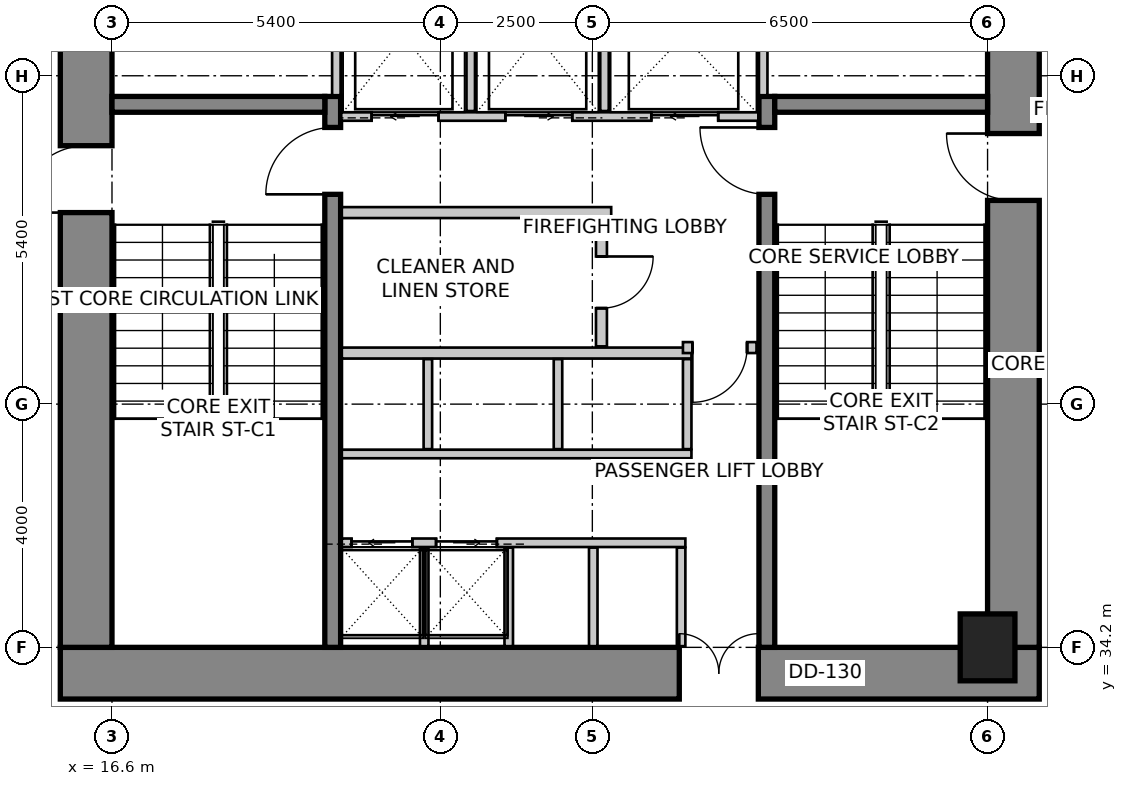
"""IFC4 building model, lengths in metres.
Left out: names, types, materials, properties, quantities, classifications, styles, units other than length and angle.
Written with IfcOpenShell. Run it as: python <this file> out.ifc"""

import sys

from ifc_helpers import new_model, si_unit, direction, frame, frame_2d, origin, origin_2d, place, context, subcontext, project, spatial, rectangle, extrude, source, transform, mapped, element, fill, save


model = new_model("IFC4")
c1 = context("Model", 3, precision=1e-05, world=origin(), true_north=direction((0.0, 1.0)))
c2 = subcontext(c1, "Body", "Model", "MODEL_VIEW")
j1 = project(units=[si_unit("LENGTHUNIT", "METRE"), si_unit("PLANEANGLEUNIT", "RADIAN")], contexts=[c1])
p1 = place(None, origin())
s1 = spatial("IfcSite", under=j1, at=p1, CompositionType="ELEMENT")
p2 = place(p1, origin())
s2 = spatial("IfcBuilding", under=s1, at=p2, CompositionType="ELEMENT")
p3 = place(p2, frame((0.0, 0.0, 55.0)))
s3 = spatial("IfcBuildingStorey", under=s2, at=p3, CompositionType="ELEMENT", Elevation=55.0)
p4 = place(p3, frame((15.75, 33.775, 0.0), z_axis=(0.0, 0.0, 1.0), x_axis=(1.0, 0.0, 0.0)))
e1 = element("IfcWall", 1, at=p4, inside=s3, PredefinedType="SHEAR", context=c2, shape_type="SweptSolid", body=[
    extrude(rectangle(XDim=16.1, YDim=0.85, at=frame_2d((8.05, 0.0))), origin(), (0.0, 0.0, 1.0), 4.0),
])
m1 = source(origin(), c2, "Body", "SweptSolid", [
    extrude(rectangle(XDim=1.3, YDim=2.15, at=frame_2d((0.65, 1.075))), frame((0.0, 0.435, 0.0), z_axis=(0.0, -1.0, 0.0), x_axis=(1.0, 0.0, 0.0)), (0.0, 0.0, 1.0), 0.87),
])
p5 = place(p4, frame((10.18, 0.0, 0.0)))
e2 = element("IfcOpeningElement", 2, at=p5, cuts=e1, PredefinedType="OPENING", context=c2, shape_type="MappedRepresentation", body=[
    mapped(m1, transform((0.0, 0.0, 0.0), scale=1.0)),
])
p6 = place(p3, frame((16.175, 34.2, 0.0), z_axis=(0.0, 0.0, 1.0), x_axis=(0.0, 1.0, 0.0)))
e3 = element("IfcWall", 3, at=p6, inside=s3, PredefinedType="SHEAR", context=c2, shape_type="SweptSolid", body=[
    extrude(rectangle(XDim=11.4, YDim=0.85, at=frame_2d((5.7, 0.0))), origin(), (0.0, 0.0, 1.0), 4.0),
])
m2 = source(origin(), c2, "Body", "SweptSolid", [
    extrude(rectangle(XDim=1.1, YDim=2.15, at=frame_2d((0.55, 1.075))), frame((0.0, 0.435, 0.0), z_axis=(0.0, -1.0, 0.0), x_axis=(1.0, 0.0, 0.0)), (0.0, 0.0, 1.0), 0.87),
])
p7 = place(p6, frame((7.15, 0.0, 0.0)))
e4 = element("IfcOpeningElement", 4, at=p7, cuts=e3, PredefinedType="OPENING", context=c2, shape_type="MappedRepresentation", body=[
    mapped(m2, transform((0.0, 0.0, 0.0), scale=1.0)),
])
p8 = place(p3, frame((31.425, 34.2, 0.0), z_axis=(0.0, 0.0, 1.0), x_axis=(0.0, 1.0, 0.0)))
e5 = element("IfcWall", 5, at=p8, inside=s3, PredefinedType="SHEAR", context=c2, shape_type="SweptSolid", body=[
    extrude(rectangle(XDim=11.4, YDim=0.85, at=frame_2d((5.7, 0.0))), origin(), (0.0, 0.0, 1.0), 4.0),
])
p9 = place(p8, frame((7.35, 0.0, 0.0)))
e6 = element("IfcOpeningElement", 6, at=p9, cuts=e5, PredefinedType="OPENING", context=c2, shape_type="MappedRepresentation", body=[
    mapped(m2, transform((0.0, 0.0, 0.0), scale=1.0)),
])
p10 = place(p3, frame((20.23, 34.2, 0.0), z_axis=(0.0, 0.0, 1.0), x_axis=(0.0, 1.0, 0.0)))
e7 = element("IfcWall", 7, at=p10, inside=s3, PredefinedType="SHEAR", context=c2, shape_type="SweptSolid", body=[
    extrude(rectangle(XDim=9.06, YDim=0.26, at=frame_2d((4.53, 0.0))), origin(), (0.0, 0.0, 1.0), 4.0),
])
m3 = source(origin(), c2, "Body", "SweptSolid", [
    extrude(rectangle(XDim=1.1, YDim=2.15, at=frame_2d((0.55, 1.075))), frame((0.0, 0.14, 0.0), z_axis=(0.0, -1.0, 0.0), x_axis=(1.0, 0.0, 0.0)), (0.0, 0.0, 1.0), 0.28),
])
p11 = place(p10, frame((7.45, 0.0, 0.0)))
e8 = element("IfcOpeningElement", 8, at=p11, cuts=e7, PredefinedType="OPENING", context=c2, shape_type="MappedRepresentation", body=[
    mapped(m3, transform((0.0, 0.0, 0.0), scale=1.0)),
])
p12 = place(p3, frame((27.37, 34.2, 0.0), z_axis=(0.0, 0.0, 1.0), x_axis=(0.0, 1.0, 0.0)))
e9 = element("IfcWall", 9, at=p12, inside=s3, PredefinedType="SHEAR", context=c2, shape_type="SweptSolid", body=[
    extrude(rectangle(XDim=9.06, YDim=0.26, at=frame_2d((4.53, 0.0))), origin(), (0.0, 0.0, 1.0), 4.0),
])
p13 = place(p12, frame((7.45, 0.0, 0.0)))
e10 = element("IfcOpeningElement", 10, at=p13, cuts=e9, PredefinedType="OPENING", context=c2, shape_type="MappedRepresentation", body=[
    mapped(m3, transform((0.0, 0.0, 0.0), scale=1.0)),
])
for number, where, z_axis, x_axis in (
    (11, (16.6, 43.13, 0.0), (0.0, 0.0, 1.0), (1.0, 0.0, 0.0)),
    (12, (27.5, 43.13, 0.0), (0.0, 0.0, 1.0), (1.0, 0.0, 0.0)),
):
    element("IfcWall", number, at=place(p3, frame(where, z_axis=z_axis, x_axis=x_axis)), inside=s3, PredefinedType="SHEAR", context=c2, shape_type="SweptSolid", body=[
        extrude(rectangle(XDim=3.5, YDim=0.26, at=frame_2d((1.75, 0.0))), origin(), (0.0, 0.0, 1.0), 4.0),
    ])
m4 = source(origin(), c2, "Body", "SweptSolid", [
    extrude(rectangle(XDim=0.9, YDim=1.1, at=origin_2d()), origin(), (0.0, 0.0, 1.0), 4.0),
])
p14 = place(p3, frame((31.0, 34.2, 0.0), z_axis=(0.0, 0.0, 1.0), x_axis=(1.0, 0.0, 0.0)))
e13 = element("IfcColumn", 13, at=p14, inside=s3, PredefinedType="COLUMN", context=c2, shape_type="MappedRepresentation", body=[
    mapped(m4, transform((0.0, 0.0, 0.0), scale=1.0)),
])
p15 = place(p3, frame((20.37, 42.93, 0.0), z_axis=(0.0, 0.0, 1.0), x_axis=(1.0, 0.0, 0.0)))
e14 = element("IfcWall", 14, at=p15, inside=s3, PredefinedType="SOLIDWALL", context=c2, shape_type="SweptSolid", body=[
    extrude(rectangle(XDim=6.86, YDim=0.14, at=frame_2d((3.43, 0.0))), origin(), (0.0, 0.0, 1.0), 3.75),
])
m5 = source(origin(), c2, "Body", "SweptSolid", [
    extrude(rectangle(XDim=1.1, YDim=2.15, at=frame_2d((0.55, 1.075))), frame((0.0, 0.08, 0.0), z_axis=(0.0, -1.0, 0.0), x_axis=(1.0, 0.0, 0.0)), (0.0, 0.0, 1.0), 0.16),
])
p16 = place(p15, frame((0.5, 0.0, 0.0)))
e15 = element("IfcOpeningElement", 15, at=p16, cuts=e14, PredefinedType="OPENING", context=c2, shape_type="MappedRepresentation", body=[
    mapped(m5, transform((0.0, 0.0, 0.0), scale=1.0)),
])
p17 = place(p15, frame((2.7, 0.0, 0.0)))
e16 = element("IfcOpeningElement", 16, at=p17, cuts=e14, PredefinedType="OPENING", context=c2, shape_type="MappedRepresentation", body=[
    mapped(m5, transform((0.0, 0.0, 0.0), scale=1.0)),
])
p18 = place(p15, frame((5.1, 0.0, 0.0)))
e17 = element("IfcOpeningElement", 17, at=p18, cuts=e14, PredefinedType="OPENING", context=c2, shape_type="MappedRepresentation", body=[
    mapped(m5, transform((0.0, 0.0, 0.0), scale=1.0)),
])
for number, where, z_axis, x_axis in (
    (18, (20.29, 43.28, 0.0), (0.0, 0.0, 1.0), (0.0, 1.0, 0.0)),
    (19, (27.31, 43.28, 0.0), (0.0, 0.0, 1.0), (0.0, 1.0, 0.0)),
):
    element("IfcWall", number, at=place(p3, frame(where, z_axis=z_axis, x_axis=x_axis)), inside=s3, PredefinedType="SOLIDWALL", context=c2, shape_type="SweptSolid", body=[
        extrude(rectangle(XDim=2.3, YDim=0.14, at=frame_2d((1.15, 0.0))), origin(), (0.0, 0.0, 1.0), 3.75),
    ])
for number, where, z_axis, x_axis in (
    (20, (22.5, 43.02, 0.0), (0.0, 0.0, 1.0), (0.0, 1.0, 0.0)),
    (21, (24.7, 43.02, 0.0), (0.0, 0.0, 1.0), (0.0, 1.0, 0.0)),
):
    element("IfcWall", number, at=place(p3, frame(where, z_axis=z_axis, x_axis=x_axis)), inside=s3, PredefinedType="SOLIDWALL", context=c2, shape_type="SweptSolid", body=[
        extrude(rectangle(XDim=2.56, YDim=0.14, at=frame_2d((1.28, 0.0))), origin(), (0.0, 0.0, 1.0), 3.75),
    ])
p19 = place(p3, frame((20.38, 35.92, 0.0), z_axis=(0.0, 0.0, 1.0), x_axis=(1.0, 0.0, 0.0)))
e22 = element("IfcWall", 22, at=p19, inside=s3, PredefinedType="SOLIDWALL", context=c2, shape_type="SweptSolid", body=[
    extrude(rectangle(XDim=5.65, YDim=0.14, at=frame_2d((2.825, 0.0))), origin(), (0.0, 0.0, 1.0), 3.75),
])
m6 = source(origin(), c2, "Body", "SweptSolid", [
    extrude(rectangle(XDim=1.0, YDim=2.15, at=frame_2d((0.5, 1.075))), frame((0.0, 0.08, 0.0), z_axis=(0.0, -1.0, 0.0), x_axis=(1.0, 0.0, 0.0)), (0.0, 0.0, 1.0), 0.16),
])
p20 = place(p19, frame((0.16, 0.0, 0.0)))
e23 = element("IfcOpeningElement", 23, at=p20, cuts=e22, PredefinedType="OPENING", context=c2, shape_type="MappedRepresentation", body=[
    mapped(m6, transform((0.0, 0.0, 0.0), scale=1.0)),
])
p21 = place(p19, frame((1.55, 0.0, 0.0)))
e24 = element("IfcOpeningElement", 24, at=p21, cuts=e22, PredefinedType="OPENING", context=c2, shape_type="MappedRepresentation", body=[
    mapped(m6, transform((0.0, 0.0, 0.0), scale=1.0)),
])
for number, where, z_axis, x_axis in (
    (25, (25.96, 34.22, 0.0), (0.0, 0.0, 1.0), (0.0, 1.0, 0.0)),
    (26, (21.735, 34.22, 0.0), (0.0, 0.0, 1.0), (0.0, 1.0, 0.0)),
    (27, (23.125, 34.22, 0.0), (0.0, 0.0, 1.0), (0.0, 1.0, 0.0)),
    (28, (24.515, 34.22, 0.0), (0.0, 0.0, 1.0), (0.0, 1.0, 0.0)),
):
    element("IfcWall", number, at=place(p3, frame(where, z_axis=z_axis, x_axis=x_axis)), inside=s3, PredefinedType="SOLIDWALL", context=c2, shape_type="SweptSolid", body=[
        extrude(rectangle(XDim=1.62, YDim=0.14, at=frame_2d((0.81, 0.0))), origin(), (0.0, 0.0, 1.0), 3.042),
    ])
p22 = place(p3, frame((20.38, 37.38, 0.0), z_axis=(0.0, 0.0, 1.0), x_axis=(1.0, 0.0, 0.0)))
e29 = element("IfcWall", 29, at=p22, inside=s3, PredefinedType="SOLIDWALL", context=c2, shape_type="SweptSolid", body=[
    extrude(rectangle(XDim=5.75, YDim=0.14, at=frame_2d((2.875, 0.0))), origin(), (0.0, 0.0, 1.0), 3.75),
])
p23 = place(p3, frame((20.38, 39.04, 0.0), z_axis=(0.0, 0.0, 1.0), x_axis=(1.0, 0.0, 0.0)))
e30 = element("IfcWall", 30, at=p23, inside=s3, PredefinedType="SOLIDWALL", context=c2, shape_type="SweptSolid", body=[
    extrude(rectangle(XDim=5.75, YDim=0.18, at=frame_2d((2.875, 0.0))), origin(), (0.0, 0.0, 1.0), 3.75),
])
for number, where, z_axis, x_axis in (
    (31, (26.06, 37.46, 0.0), (0.0, 0.0, 1.0), (0.0, 1.0, 0.0)),
    (32, (21.795, 37.46, 0.0), (0.0, 0.0, 1.0), (0.0, 1.0, 0.0)),
    (33, (23.935, 37.46, 0.0), (0.0, 0.0, 1.0), (0.0, 1.0, 0.0)),
):
    element("IfcWall", number, at=place(p3, frame(where, z_axis=z_axis, x_axis=x_axis)), inside=s3, PredefinedType="SOLIDWALL", context=c2, shape_type="SweptSolid", body=[
        extrude(rectangle(XDim=1.48, YDim=0.14, at=frame_2d((0.74, 0.0))), origin(), (0.0, 0.0, 1.0), 3.75),
    ])
p24 = place(p3, frame((24.81, 41.35, 0.0), z_axis=(0.0, 0.0, 1.0), x_axis=(-1.0, 0.0, 0.0)))
e34 = element("IfcWall", 34, at=p24, inside=s3, PredefinedType="PARTITIONING", context=c2, shape_type="SweptSolid", body=[
    extrude(rectangle(XDim=4.43, YDim=0.18, at=frame_2d((2.215, 0.0))), origin(), (0.0, 0.0, 1.0), 3.75),
])
p25 = place(p3, frame((24.65, 41.256, 0.0), z_axis=(0.0, 0.0, 1.0), x_axis=(0.0, -1.0, 0.0)))
e35 = element("IfcWall", 35, at=p25, inside=s3, PredefinedType="PARTITIONING", context=c2, shape_type="SweptSolid", body=[
    extrude(rectangle(XDim=2.106, YDim=0.18, at=frame_2d((1.053, 0.0))), origin(), (0.0, 0.0, 1.0), 3.75),
])
m7 = source(origin(), c2, "Body", "SweptSolid", [
    extrude(rectangle(XDim=0.85, YDim=2.15, at=frame_2d((0.425, 1.075))), frame((0.0, 0.1, 0.0), z_axis=(0.0, -1.0, 0.0), x_axis=(1.0, 0.0, 0.0)), (0.0, 0.0, 1.0), 0.2),
])
p26 = place(p25, frame((0.628, 0.0, 0.0)))
e36 = element("IfcOpeningElement", 36, at=p26, cuts=e35, PredefinedType="OPENING", context=c2, shape_type="MappedRepresentation", body=[
    mapped(m7, transform((0.0, 0.0, 0.0), scale=1.0)),
])
p27 = place(p3, frame((27.2, 39.13, 0.0), z_axis=(0.0, 0.0, 1.0), x_axis=(-1.0, 0.0, 0.0)))
e37 = element("IfcWall", 37, at=p27, inside=s3, PredefinedType="PARTITIONING", context=c2, shape_type="SweptSolid", body=[
    extrude(rectangle(XDim=1.21, YDim=0.18, at=frame_2d((0.605, 0.0))), origin(), (0.0, 0.0, 1.0), 3.75),
])
m8 = source(origin(), c2, "Body", "SweptSolid", [
    extrude(rectangle(XDim=0.9, YDim=2.15, at=frame_2d((0.45, 1.075))), frame((0.0, 0.1, 0.0), z_axis=(0.0, -1.0, 0.0), x_axis=(1.0, 0.0, 0.0)), (0.0, 0.0, 1.0), 0.2),
])
p28 = place(p27, frame((0.155, 0.0, 0.0)))
e38 = element("IfcOpeningElement", 38, at=p28, cuts=e37, PredefinedType="OPENING", context=c2, shape_type="MappedRepresentation", body=[
    mapped(m8, transform((0.0, 0.0, 0.0), scale=1.0)),
])
m9 = source(origin(), c2, "Body", "SweptSolid", [
    extrude(rectangle(XDim=1.1, YDim=2.15, at=frame_2d((0.55, 1.075))), frame((0.0, 0.025, 0.0), z_axis=(0.0, -1.0, 0.0), x_axis=(1.0, 0.0, 0.0)), (0.0, 0.0, 1.0), 0.05),
])
p29 = place(p16, origin())
e39 = element("IfcDoor", 39, at=p29, inside=s3, OperationType="SLIDING_TO_LEFT", PredefinedType="DOOR", context=c2, shape_type="MappedRepresentation", body=[
    mapped(m9, transform((0.0, 0.0, 0.0), scale=1.0)),
])
fill(e15, e39)
p30 = place(p17, origin())
e40 = element("IfcDoor", 40, at=p30, inside=s3, OperationType="SLIDING_TO_RIGHT", PredefinedType="DOOR", context=c2, shape_type="MappedRepresentation", body=[
    mapped(m9, transform((0.0, 0.0, 0.0), scale=1.0)),
])
fill(e16, e40)
m10 = source(origin(), c2, "Body", "SweptSolid", [
    extrude(rectangle(XDim=1.1, YDim=2.15, at=frame_2d((0.55, 1.075))), frame((0.0, 0.025, 0.0), z_axis=(0.0, -1.0, 0.0), x_axis=(1.0, 0.0, 0.0)), (0.0, 0.0, 1.0), 0.05),
])
p31 = place(p18, origin())
e41 = element("IfcDoor", 41, at=p31, inside=s3, OperationType="SLIDING_TO_LEFT", PredefinedType="DOOR", context=c2, shape_type="MappedRepresentation", body=[
    mapped(m10, transform((0.0, 0.0, 0.0), scale=1.0)),
])
fill(e17, e41)
m11 = source(origin(), c2, "Body", "SweptSolid", [
    extrude(rectangle(XDim=1.0, YDim=2.15, at=frame_2d((0.5, 1.075))), frame((0.0, 0.025, 0.0), z_axis=(0.0, -1.0, 0.0), x_axis=(1.0, 0.0, 0.0)), (0.0, 0.0, 1.0), 0.05),
])
p32 = place(p20, origin())
e42 = element("IfcDoor", 42, at=p32, inside=s3, OperationType="SLIDING_TO_LEFT", PredefinedType="DOOR", context=c2, shape_type="MappedRepresentation", body=[
    mapped(m11, transform((0.0, 0.0, 0.0), scale=1.0)),
])
fill(e23, e42)
p33 = place(p21, origin())
e43 = element("IfcDoor", 43, at=p33, inside=s3, OperationType="SLIDING_TO_RIGHT", PredefinedType="DOOR", context=c2, shape_type="MappedRepresentation", body=[
    mapped(m11, transform((0.0, 0.0, 0.0), scale=1.0)),
])
fill(e24, e43)
m12 = source(origin(), c2, "Body", "SweptSolid", [
    extrude(rectangle(XDim=1.1, YDim=2.15, at=frame_2d((0.55, 1.075))), frame((0.0, 0.025, 0.0), z_axis=(0.0, -1.0, 0.0), x_axis=(1.0, 0.0, 0.0)), (0.0, 0.0, 1.0), 0.05),
])
p34 = place(p11, origin())
e44 = element("IfcDoor", 44, at=p34, inside=s3, OperationType="SINGLE_SWING_LEFT", PredefinedType="DOOR", context=c2, shape_type="MappedRepresentation", body=[
    mapped(m12, transform((0.0, 0.0, 0.0), scale=1.0)),
])
fill(e8, e44)
p35 = place(p13, origin())
e45 = element("IfcDoor", 45, at=p35, inside=s3, OperationType="SINGLE_SWING_RIGHT", PredefinedType="DOOR", context=c2, shape_type="MappedRepresentation", body=[
    mapped(m12, transform((0.0, 0.0, 0.0), scale=1.0)),
])
fill(e10, e45)
p36 = place(p7, origin())
e46 = element("IfcDoor", 46, at=p36, inside=s3, OperationType="SINGLE_SWING_LEFT", PredefinedType="DOOR", context=c2, shape_type="MappedRepresentation", body=[
    mapped(m12, transform((0.0, 0.0, 0.0), scale=1.0)),
])
fill(e4, e46)
p37 = place(p9, origin())
e47 = element("IfcDoor", 47, at=p37, inside=s3, OperationType="SINGLE_SWING_RIGHT", PredefinedType="DOOR", context=c2, shape_type="MappedRepresentation", body=[
    mapped(m12, transform((0.0, 0.0, 0.0), scale=1.0)),
])
fill(e6, e47)
m13 = source(origin(), c2, "Body", "SweptSolid", [
    extrude(rectangle(XDim=1.3, YDim=2.15, at=frame_2d((0.65, 1.075))), frame((0.0, 0.025, 0.0), z_axis=(0.0, -1.0, 0.0), x_axis=(1.0, 0.0, 0.0)), (0.0, 0.0, 1.0), 0.05),
])
p38 = place(p5, origin())
e48 = element("IfcDoor", 48, at=p38, inside=s3, OperationType="DOUBLE_DOOR_SINGLE_SWING", PredefinedType="DOOR", context=c2, shape_type="MappedRepresentation", body=[
    mapped(m13, transform((0.0, 0.0, 0.0), scale=1.0)),
])
fill(e2, e48)
m14 = source(origin(), c2, "Body", "SweptSolid", [
    extrude(rectangle(XDim=0.85, YDim=2.15, at=frame_2d((0.425, 1.075))), frame((0.0, 0.025, 0.0), z_axis=(0.0, -1.0, 0.0), x_axis=(1.0, 0.0, 0.0)), (0.0, 0.0, 1.0), 0.05),
])
p39 = place(p26, origin())
e49 = element("IfcDoor", 49, at=p39, inside=s3, OperationType="SINGLE_SWING_LEFT", PredefinedType="DOOR", context=c2, shape_type="MappedRepresentation", body=[
    mapped(m14, transform((0.0, 0.0, 0.0), scale=1.0)),
])
fill(e36, e49)
m15 = source(origin(), c2, "Body", "SweptSolid", [
    extrude(rectangle(XDim=0.9, YDim=2.15, at=frame_2d((0.45, 1.075))), frame((0.0, 0.025, 0.0), z_axis=(0.0, -1.0, 0.0), x_axis=(1.0, 0.0, 0.0)), (0.0, 0.0, 1.0), 0.05),
])
p40 = place(p28, origin())
e50 = element("IfcDoor", 50, at=p40, inside=s3, OperationType="SINGLE_SWING_RIGHT", PredefinedType="DOOR", context=c2, shape_type="MappedRepresentation", body=[
    mapped(m15, transform((0.0, 0.0, 0.0), scale=1.0)),
])
fill(e38, e50)
save(model, sys.argv[1])
